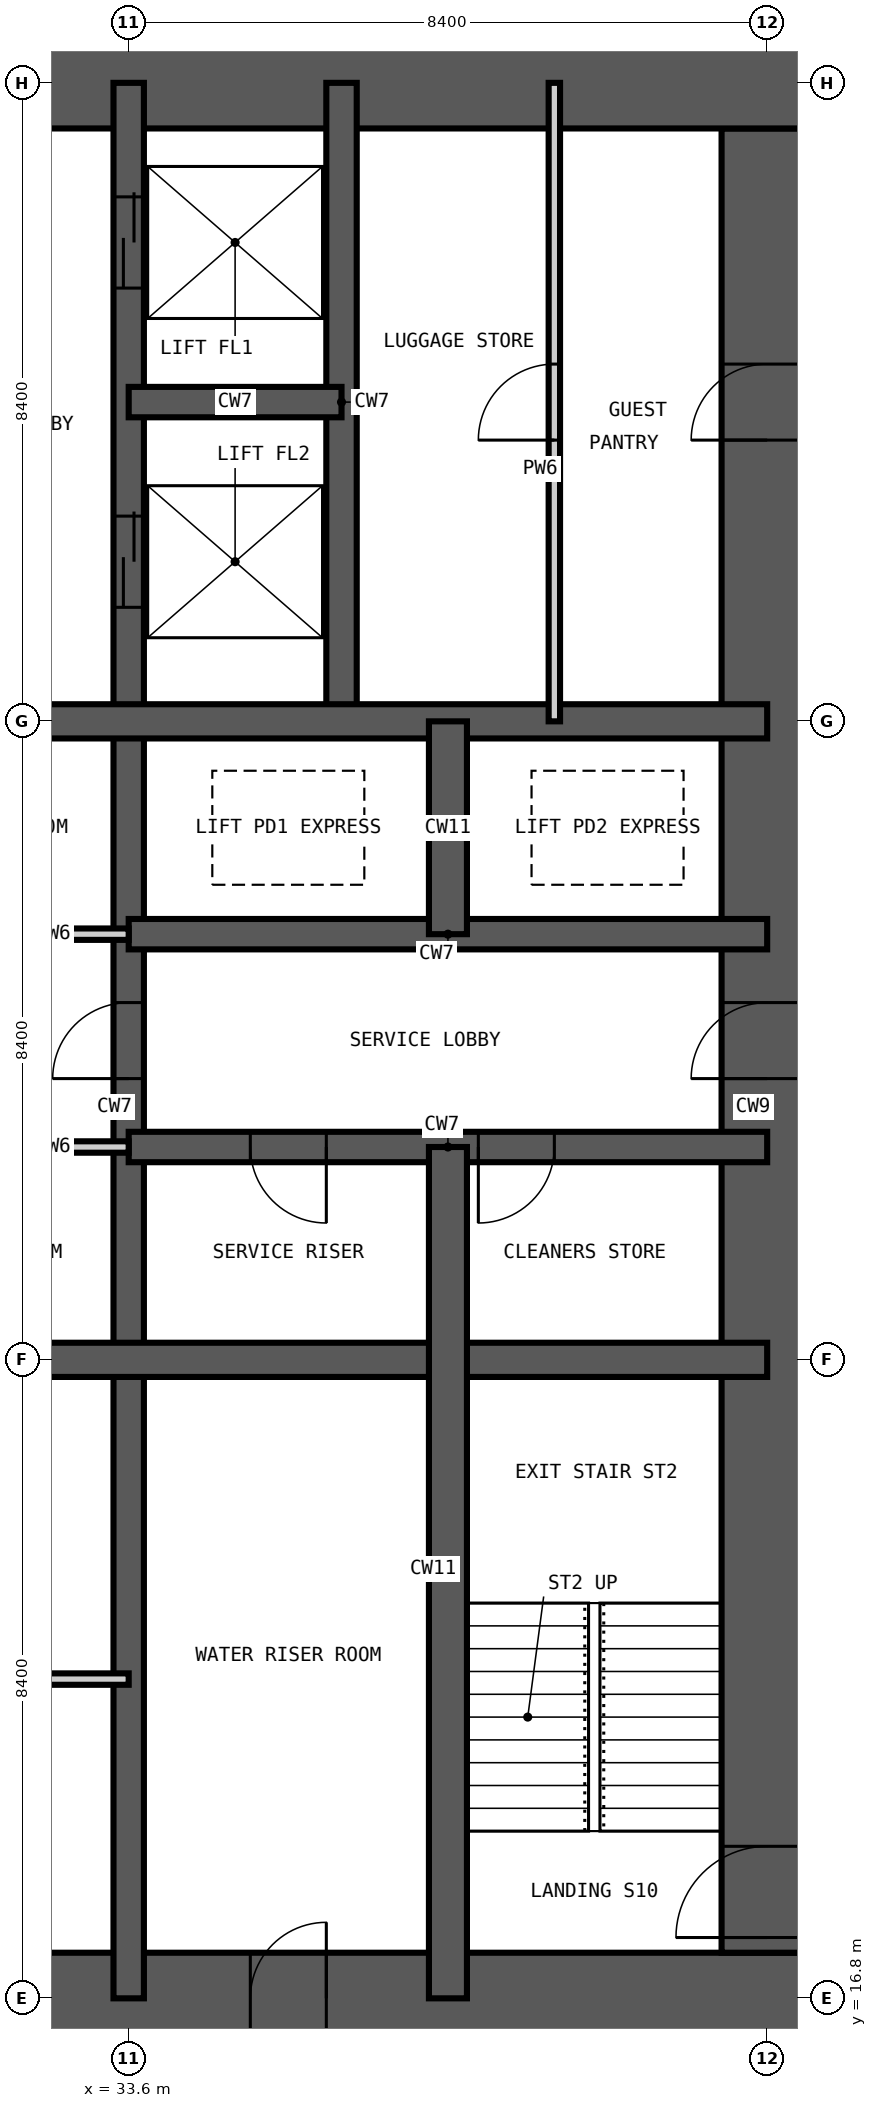
"""IFC4 building model, lengths in metres.
Left out: names, types, materials, properties, quantities, classifications, styles, units other than length and angle.
Written with IfcOpenShell. Run it as: python <this file> out.ifc"""

import sys

from ifc_helpers import new_model, si_unit, direction, frame, frame_2d, origin, place, context, subcontext, project, spatial, rectangle, extrude, element, fill, save


model = new_model("IFC4")
c1 = context("Model", 3, precision=1e-05, world=origin(), true_north=direction((0.0, 1.0)))
c2 = subcontext(c1, "Body", "Model", "MODEL_VIEW")
j1 = project(units=[si_unit("LENGTHUNIT", "METRE"), si_unit("PLANEANGLEUNIT", "RADIAN")], contexts=[c1])
p1 = place(None, origin())
s1 = spatial("IfcSite", under=j1, at=p1, CompositionType="ELEMENT")
p2 = place(p1, origin())
s2 = spatial("IfcBuilding", under=s1, at=p2, CompositionType="ELEMENT")
p3 = place(p2, frame((0.0, 0.0, 213.0)))
s3 = spatial("IfcBuildingStorey", under=s2, at=p3, CompositionType="ELEMENT", Elevation=213.0)
p4 = place(p3, frame((16.2, 16.8, -0.35), z_axis=(0.0, 0.0, 1.0), x_axis=(1.0, 0.0, 0.0)))
e1 = element("IfcWall", 1, at=p4, inside=s3, PredefinedType="SHEAR", context=c2, shape_type="SweptSolid", body=[
    extrude(rectangle(XDim=26.4, YDim=1.2, at=frame_2d((13.2, 0.0))), origin(), (0.0, 0.0, 1.0), 3.6),
])
p5 = place(p4, frame((12.7, 0.0, 0.35)))
e2 = element("IfcOpeningElement", 2, at=p5, cuts=e1, PredefinedType="OPENING", context=c2, shape_type="SweptSolid", body=[
    extrude(rectangle(XDim=1.0, YDim=2.1, at=frame_2d((0.5, 1.05))), frame((0.0, 0.61, 0.0), z_axis=(0.0, -1.0, 0.0), x_axis=(1.0, 0.0, 0.0)), (0.0, 0.0, 1.0), 1.22),
])
p6 = place(p4, frame((19.0, 0.0, 0.35)))
e3 = element("IfcOpeningElement", 3, at=p6, cuts=e1, PredefinedType="OPENING", context=c2, shape_type="SweptSolid", body=[
    extrude(rectangle(XDim=1.0, YDim=2.1, at=frame_2d((0.5, 1.05))), frame((0.0, 0.61, 0.0), z_axis=(0.0, -1.0, 0.0), x_axis=(1.0, 0.0, 0.0)), (0.0, 0.0, 1.0), 1.22),
])
p7 = place(p3, frame((42.0, 17.4, -0.35), z_axis=(0.0, 0.0, 1.0), x_axis=(0.0, 1.0, 0.0)))
e4 = element("IfcWall", 4, at=p7, inside=s3, PredefinedType="SHEAR", context=c2, shape_type="SweptSolid", body=[
    extrude(rectangle(XDim=24.0, YDim=1.2, at=frame_2d((12.0, 0.0))), origin(), (0.0, 0.0, 1.0), 3.6),
])
p8 = place(p7, frame((0.2, 0.0, 0.35)))
e5 = element("IfcOpeningElement", 5, at=p8, cuts=e4, PredefinedType="OPENING", context=c2, shape_type="SweptSolid", body=[
    extrude(rectangle(XDim=1.2, YDim=2.2, at=frame_2d((0.6, 1.1))), frame((0.0, 0.61, 0.0), z_axis=(0.0, -1.0, 0.0), x_axis=(1.0, 0.0, 0.0)), (0.0, 0.0, 1.0), 1.22),
])
p9 = place(p7, frame((11.5, 0.0, 0.35)))
e6 = element("IfcOpeningElement", 6, at=p9, cuts=e4, PredefinedType="OPENING", context=c2, shape_type="SweptSolid", body=[
    extrude(rectangle(XDim=1.0, YDim=2.1, at=frame_2d((0.5, 1.05))), frame((0.0, 0.61, 0.0), z_axis=(0.0, -1.0, 0.0), x_axis=(1.0, 0.0, 0.0)), (0.0, 0.0, 1.0), 1.22),
])
p10 = place(p7, frame((19.9, 0.0, 0.35)))
e7 = element("IfcOpeningElement", 7, at=p10, cuts=e4, PredefinedType="OPENING", context=c2, shape_type="SweptSolid", body=[
    extrude(rectangle(XDim=1.0, YDim=2.1, at=frame_2d((0.5, 1.05))), frame((0.0, 0.61, 0.0), z_axis=(0.0, -1.0, 0.0), x_axis=(1.0, 0.0, 0.0)), (0.0, 0.0, 1.0), 1.22),
])
p11 = place(p3, frame((42.6, 42.0, -0.35), z_axis=(0.0, 0.0, 1.0), x_axis=(-1.0, 0.0, 0.0)))
e8 = element("IfcWall", 8, at=p11, inside=s3, PredefinedType="SHEAR", context=c2, shape_type="SweptSolid", body=[
    extrude(rectangle(XDim=26.4, YDim=1.2, at=frame_2d((13.2, 0.0))), origin(), (0.0, 0.0, 1.0), 3.6),
])
p12 = place(p11, frame((21.1, 0.0, 0.35)))
e9 = element("IfcOpeningElement", 9, at=p12, cuts=e8, PredefinedType="OPENING", context=c2, shape_type="SweptSolid", body=[
    extrude(rectangle(XDim=1.0, YDim=2.1, at=frame_2d((0.5, 1.05))), frame((0.0, 0.61, 0.0), z_axis=(0.0, -1.0, 0.0), x_axis=(1.0, 0.0, 0.0)), (0.0, 0.0, 1.0), 1.22),
])
p13 = place(p11, frame((10.5, 0.0, 0.35)))
e10 = element("IfcOpeningElement", 10, at=p13, cuts=e8, PredefinedType="OPENING", context=c2, shape_type="SweptSolid", body=[
    extrude(rectangle(XDim=1.2, YDim=2.2, at=frame_2d((0.6, 1.1))), frame((0.0, 0.61, 0.0), z_axis=(0.0, -1.0, 0.0), x_axis=(1.0, 0.0, 0.0)), (0.0, 0.0, 1.0), 1.22),
])
p14 = place(p3, frame((33.6, 16.8, -0.35), z_axis=(0.0, 0.0, 1.0), x_axis=(0.0, 1.0, 0.0)))
e11 = element("IfcWall", 11, at=p14, inside=s3, PredefinedType="SHEAR", context=c2, shape_type="SweptSolid", body=[
    extrude(rectangle(XDim=25.2, YDim=0.4, at=frame_2d((12.6, 0.0))), origin(), (0.0, 0.0, 1.0), 3.6),
])
p15 = place(p14, frame((22.5, 0.0, 0.35)))
e12 = element("IfcOpeningElement", 12, at=p15, cuts=e11, PredefinedType="OPENING", context=c2, shape_type="SweptSolid", body=[
    extrude(rectangle(XDim=1.2, YDim=2.2, at=frame_2d((0.6, 1.1))), frame((0.0, 0.21, 0.0), z_axis=(0.0, -1.0, 0.0), x_axis=(1.0, 0.0, 0.0)), (0.0, 0.0, 1.0), 0.42),
])
p16 = place(p14, frame((18.3, 0.0, 0.35)))
e13 = element("IfcOpeningElement", 13, at=p16, cuts=e11, PredefinedType="OPENING", context=c2, shape_type="SweptSolid", body=[
    extrude(rectangle(XDim=1.2, YDim=2.2, at=frame_2d((0.6, 1.1))), frame((0.0, 0.21, 0.0), z_axis=(0.0, -1.0, 0.0), x_axis=(1.0, 0.0, 0.0)), (0.0, 0.0, 1.0), 0.42),
])
p17 = place(p14, frame((12.1, 0.0, 0.35)))
e14 = element("IfcOpeningElement", 14, at=p17, cuts=e11, PredefinedType="OPENING", context=c2, shape_type="SweptSolid", body=[
    extrude(rectangle(XDim=1.0, YDim=2.1, at=frame_2d((0.5, 1.05))), frame((0.0, 0.21, 0.0), z_axis=(0.0, -1.0, 0.0), x_axis=(1.0, 0.0, 0.0)), (0.0, 0.0, 1.0), 0.42),
])
p18 = place(p3, frame((36.4, 33.6, -0.35), z_axis=(0.0, 0.0, 1.0), x_axis=(0.0, 1.0, 0.0)))
e15 = element("IfcWall", 15, at=p18, inside=s3, PredefinedType="SHEAR", context=c2, shape_type="SweptSolid", body=[
    extrude(rectangle(XDim=8.4, YDim=0.4, at=frame_2d((4.2, 0.0))), origin(), (0.0, 0.0, 1.0), 3.6),
])
p19 = place(p3, frame((33.6, 28.0, -0.35), z_axis=(0.0, 0.0, 1.0), x_axis=(1.0, 0.0, 0.0)))
e16 = element("IfcWall", 16, at=p19, inside=s3, PredefinedType="SHEAR", context=c2, shape_type="SweptSolid", body=[
    extrude(rectangle(XDim=8.4, YDim=0.4, at=frame_2d((4.2, 0.0))), origin(), (0.0, 0.0, 1.0), 3.6),
])
p20 = place(p19, frame((1.6, 0.0, 0.35)))
e17 = element("IfcOpeningElement", 17, at=p20, cuts=e16, PredefinedType="OPENING", context=c2, shape_type="SweptSolid", body=[
    extrude(rectangle(XDim=1.0, YDim=2.1, at=frame_2d((0.5, 1.05))), frame((0.0, 0.21, 0.0), z_axis=(0.0, -1.0, 0.0), x_axis=(1.0, 0.0, 0.0)), (0.0, 0.0, 1.0), 0.42),
])
p21 = place(p19, frame((4.6, 0.0, 0.35)))
e18 = element("IfcOpeningElement", 18, at=p21, cuts=e16, PredefinedType="OPENING", context=c2, shape_type="SweptSolid", body=[
    extrude(rectangle(XDim=1.0, YDim=2.1, at=frame_2d((0.5, 1.05))), frame((0.0, 0.21, 0.0), z_axis=(0.0, -1.0, 0.0), x_axis=(1.0, 0.0, 0.0)), (0.0, 0.0, 1.0), 0.42),
])
p22 = place(p3, frame((33.6, 30.8, -0.35), z_axis=(0.0, 0.0, 1.0), x_axis=(1.0, 0.0, 0.0)))
e19 = element("IfcWall", 19, at=p22, inside=s3, PredefinedType="SHEAR", context=c2, shape_type="SweptSolid", body=[
    extrude(rectangle(XDim=8.4, YDim=0.4, at=frame_2d((4.2, 0.0))), origin(), (0.0, 0.0, 1.0), 3.6),
])
p23 = place(p3, frame((33.6, 37.8, -0.35), z_axis=(0.0, 0.0, 1.0), x_axis=(1.0, 0.0, 0.0)))
e20 = element("IfcWall", 20, at=p23, inside=s3, PredefinedType="SHEAR", context=c2, shape_type="SweptSolid", body=[
    extrude(rectangle(XDim=2.8, YDim=0.4, at=frame_2d((1.4, 0.0))), origin(), (0.0, 0.0, 1.0), 3.6),
])
for number, where, z_axis, x_axis in (
    (21, (16.8, 25.2, -0.35), (0.0, 0.0, 1.0), (1.0, 0.0, 0.0)),
    (22, (16.8, 33.6, -0.35), (0.0, 0.0, 1.0), (1.0, 0.0, 0.0)),
):
    element("IfcWall", number, at=place(p3, frame(where, z_axis=z_axis, x_axis=x_axis)), inside=s3, PredefinedType="SHEAR", context=c2, shape_type="SweptSolid", body=[
        extrude(rectangle(XDim=25.2, YDim=0.45, at=frame_2d((12.6, 0.0))), origin(), (0.0, 0.0, 1.0), 3.6),
    ])
p24 = place(p3, frame((37.8, 16.8, -0.35), z_axis=(0.0, 0.0, 1.0), x_axis=(0.0, 1.0, 0.0)))
e23 = element("IfcWall", 23, at=p24, inside=s3, PredefinedType="SHEAR", context=c2, shape_type="SweptSolid", body=[
    extrude(rectangle(XDim=11.2, YDim=0.5, at=frame_2d((5.6, 0.0))), origin(), (0.0, 0.0, 1.0), 3.6),
])
p25 = place(p3, frame((37.8, 30.8, -0.35), z_axis=(0.0, 0.0, 1.0), x_axis=(0.0, 1.0, 0.0)))
e24 = element("IfcWall", 24, at=p25, inside=s3, PredefinedType="SHEAR", context=c2, shape_type="SweptSolid", body=[
    extrude(rectangle(XDim=2.8, YDim=0.5, at=frame_2d((1.4, 0.0))), origin(), (0.0, 0.0, 1.0), 3.6),
])
p26 = place(p3, frame((39.2, 33.6, 0.0), z_axis=(0.0, 0.0, 1.0), x_axis=(0.0, 1.0, 0.0)))
e25 = element("IfcWall", 25, at=p26, inside=s3, PredefinedType="PARTITIONING", context=c2, shape_type="SweptSolid", body=[
    extrude(rectangle(XDim=8.4, YDim=0.15, at=frame_2d((4.2, 0.0))), origin(), (0.0, 0.0, 1.0), 3.25),
])
p27 = place(p26, frame((3.7, 0.0, 0.0)))
e26 = element("IfcOpeningElement", 26, at=p27, cuts=e25, PredefinedType="OPENING", context=c2, shape_type="SweptSolid", body=[
    extrude(rectangle(XDim=1.0, YDim=2.1, at=frame_2d((0.5, 1.05))), frame((0.0, 0.085, 0.0), z_axis=(0.0, -1.0, 0.0), x_axis=(1.0, 0.0, 0.0)), (0.0, 0.0, 1.0), 0.17),
])
p28 = place(p3, frame((25.2, 21.0, 0.0), z_axis=(0.0, 0.0, 1.0), x_axis=(1.0, 0.0, 0.0)))
e27 = element("IfcWall", 27, at=p28, inside=s3, PredefinedType="PARTITIONING", context=c2, shape_type="SweptSolid", body=[
    extrude(rectangle(XDim=8.4, YDim=0.15, at=frame_2d((4.2, 0.0))), origin(), (0.0, 0.0, 1.0), 3.25),
])
p29 = place(p28, frame((3.7, 0.0, 0.0)))
e28 = element("IfcOpeningElement", 28, at=p29, cuts=e27, PredefinedType="OPENING", context=c2, shape_type="SweptSolid", body=[
    extrude(rectangle(XDim=1.0, YDim=2.1, at=frame_2d((0.5, 1.05))), frame((0.0, 0.085, 0.0), z_axis=(0.0, -1.0, 0.0), x_axis=(1.0, 0.0, 0.0)), (0.0, 0.0, 1.0), 0.17),
])
p30 = place(p3, frame((29.4, 28.0, 0.0), z_axis=(0.0, 0.0, 1.0), x_axis=(1.0, 0.0, 0.0)))
e29 = element("IfcWall", 29, at=p30, inside=s3, PredefinedType="PARTITIONING", context=c2, shape_type="SweptSolid", body=[
    extrude(rectangle(XDim=4.2, YDim=0.15, at=frame_2d((2.1, 0.0))), origin(), (0.0, 0.0, 1.0), 3.25),
])
p31 = place(p30, frame((1.6, 0.0, 0.0)))
e30 = element("IfcOpeningElement", 30, at=p31, cuts=e29, PredefinedType="OPENING", context=c2, shape_type="SweptSolid", body=[
    extrude(rectangle(XDim=1.0, YDim=2.1, at=frame_2d((0.5, 1.05))), frame((0.0, 0.085, 0.0), z_axis=(0.0, -1.0, 0.0), x_axis=(1.0, 0.0, 0.0)), (0.0, 0.0, 1.0), 0.17),
])
p32 = place(p3, frame((29.4, 30.8, 0.0), z_axis=(0.0, 0.0, 1.0), x_axis=(1.0, 0.0, 0.0)))
e31 = element("IfcWall", 31, at=p32, inside=s3, PredefinedType="PARTITIONING", context=c2, shape_type="SweptSolid", body=[
    extrude(rectangle(XDim=4.2, YDim=0.15, at=frame_2d((2.1, 0.0))), origin(), (0.0, 0.0, 1.0), 3.25),
])
p33 = place(p32, frame((1.6, 0.0, 0.0)))
e32 = element("IfcOpeningElement", 32, at=p33, cuts=e31, PredefinedType="OPENING", context=c2, shape_type="SweptSolid", body=[
    extrude(rectangle(XDim=1.0, YDim=2.1, at=frame_2d((0.5, 1.05))), frame((0.0, 0.085, 0.0), z_axis=(0.0, -1.0, 0.0), x_axis=(1.0, 0.0, 0.0)), (0.0, 0.0, 1.0), 0.17),
])
p34 = place(p8, origin())
e33 = element("IfcDoor", 33, at=p34, inside=s3, OperationType="SINGLE_SWING_LEFT", PredefinedType="DOOR", context=c2, shape_type="SweptSolid", body=[
    extrude(rectangle(XDim=1.2, YDim=2.2, at=frame_2d((0.6, 1.1))), frame((0.0, 0.025, 0.0), z_axis=(0.0, -1.0, 0.0), x_axis=(1.0, 0.0, 0.0)), (0.0, 0.0, 1.0), 0.05),
])
fill(e5, e33)
p35 = place(p15, origin())
e34 = element("IfcDoor", 34, at=p35, inside=s3, OperationType="DOUBLE_DOOR_SLIDING", PredefinedType="DOOR", context=c2, shape_type="SweptSolid", body=[
    extrude(rectangle(XDim=1.2, YDim=2.2, at=frame_2d((0.6, 1.1))), frame((0.0, 0.025, 0.0), z_axis=(0.0, -1.0, 0.0), x_axis=(1.0, 0.0, 0.0)), (0.0, 0.0, 1.0), 0.05),
])
fill(e12, e34)
p36 = place(p16, origin())
e35 = element("IfcDoor", 35, at=p36, inside=s3, OperationType="DOUBLE_DOOR_SLIDING", PredefinedType="DOOR", context=c2, shape_type="SweptSolid", body=[
    extrude(rectangle(XDim=1.2, YDim=2.2, at=frame_2d((0.6, 1.1))), frame((0.0, 0.025, 0.0), z_axis=(0.0, -1.0, 0.0), x_axis=(1.0, 0.0, 0.0)), (0.0, 0.0, 1.0), 0.05),
])
fill(e13, e35)
p37 = place(p17, origin())
e36 = element("IfcDoor", 36, at=p37, inside=s3, OperationType="SINGLE_SWING_LEFT", PredefinedType="DOOR", context=c2, shape_type="SweptSolid", body=[
    extrude(rectangle(XDim=1.0, YDim=2.1, at=frame_2d((0.5, 1.05))), frame((0.0, 0.025, 0.0), z_axis=(0.0, -1.0, 0.0), x_axis=(1.0, 0.0, 0.0)), (0.0, 0.0, 1.0), 0.05),
])
fill(e14, e36)
p38 = place(p20, frame((1.0, 0.0, 0.0), z_axis=(0.0, 0.0, 1.0), x_axis=(-1.0, 0.0, 0.0)))
e37 = element("IfcDoor", 37, at=p38, inside=s3, OperationType="SINGLE_SWING_LEFT", PredefinedType="DOOR", context=c2, shape_type="SweptSolid", body=[
    extrude(rectangle(XDim=1.0, YDim=2.1, at=frame_2d((0.5, 1.05))), frame((0.0, 0.025, 0.0), z_axis=(0.0, -1.0, 0.0), x_axis=(1.0, 0.0, 0.0)), (0.0, 0.0, 1.0), 0.05),
])
fill(e17, e37)
p39 = place(p21, frame((1.0, 0.0, 0.0), z_axis=(0.0, 0.0, 1.0), x_axis=(-1.0, 0.0, 0.0)))
e38 = element("IfcDoor", 38, at=p39, inside=s3, OperationType="SINGLE_SWING_RIGHT", PredefinedType="DOOR", context=c2, shape_type="SweptSolid", body=[
    extrude(rectangle(XDim=1.0, YDim=2.1, at=frame_2d((0.5, 1.05))), frame((0.0, 0.025, 0.0), z_axis=(0.0, -1.0, 0.0), x_axis=(1.0, 0.0, 0.0)), (0.0, 0.0, 1.0), 0.05),
])
fill(e18, e38)
p40 = place(p9, origin())
e39 = element("IfcDoor", 39, at=p40, inside=s3, OperationType="SINGLE_SWING_LEFT", PredefinedType="DOOR", context=c2, shape_type="SweptSolid", body=[
    extrude(rectangle(XDim=1.0, YDim=2.1, at=frame_2d((0.5, 1.05))), frame((0.0, 0.025, 0.0), z_axis=(0.0, -1.0, 0.0), x_axis=(1.0, 0.0, 0.0)), (0.0, 0.0, 1.0), 0.05),
])
fill(e6, e39)
p41 = place(p10, origin())
e40 = element("IfcDoor", 40, at=p41, inside=s3, OperationType="SINGLE_SWING_LEFT", PredefinedType="DOOR", context=c2, shape_type="SweptSolid", body=[
    extrude(rectangle(XDim=1.0, YDim=2.1, at=frame_2d((0.5, 1.05))), frame((0.0, 0.025, 0.0), z_axis=(0.0, -1.0, 0.0), x_axis=(1.0, 0.0, 0.0)), (0.0, 0.0, 1.0), 0.05),
])
fill(e7, e40)
p42 = place(p27, origin())
e41 = element("IfcDoor", 41, at=p42, inside=s3, OperationType="SINGLE_SWING_LEFT", PredefinedType="DOOR", context=c2, shape_type="SweptSolid", body=[
    extrude(rectangle(XDim=1.0, YDim=2.1, at=frame_2d((0.5, 1.05))), frame((0.0, 0.025, 0.0), z_axis=(0.0, -1.0, 0.0), x_axis=(1.0, 0.0, 0.0)), (0.0, 0.0, 1.0), 0.05),
])
fill(e26, e41)
p43 = place(p6, origin())
e42 = element("IfcDoor", 42, at=p43, inside=s3, OperationType="SINGLE_SWING_RIGHT", PredefinedType="DOOR", context=c2, shape_type="SweptSolid", body=[
    extrude(rectangle(XDim=1.0, YDim=2.1, at=frame_2d((0.5, 1.05))), frame((0.0, 0.025, 0.0), z_axis=(0.0, -1.0, 0.0), x_axis=(1.0, 0.0, 0.0)), (0.0, 0.0, 1.0), 0.05),
])
fill(e3, e42)
save(model, sys.argv[1])
